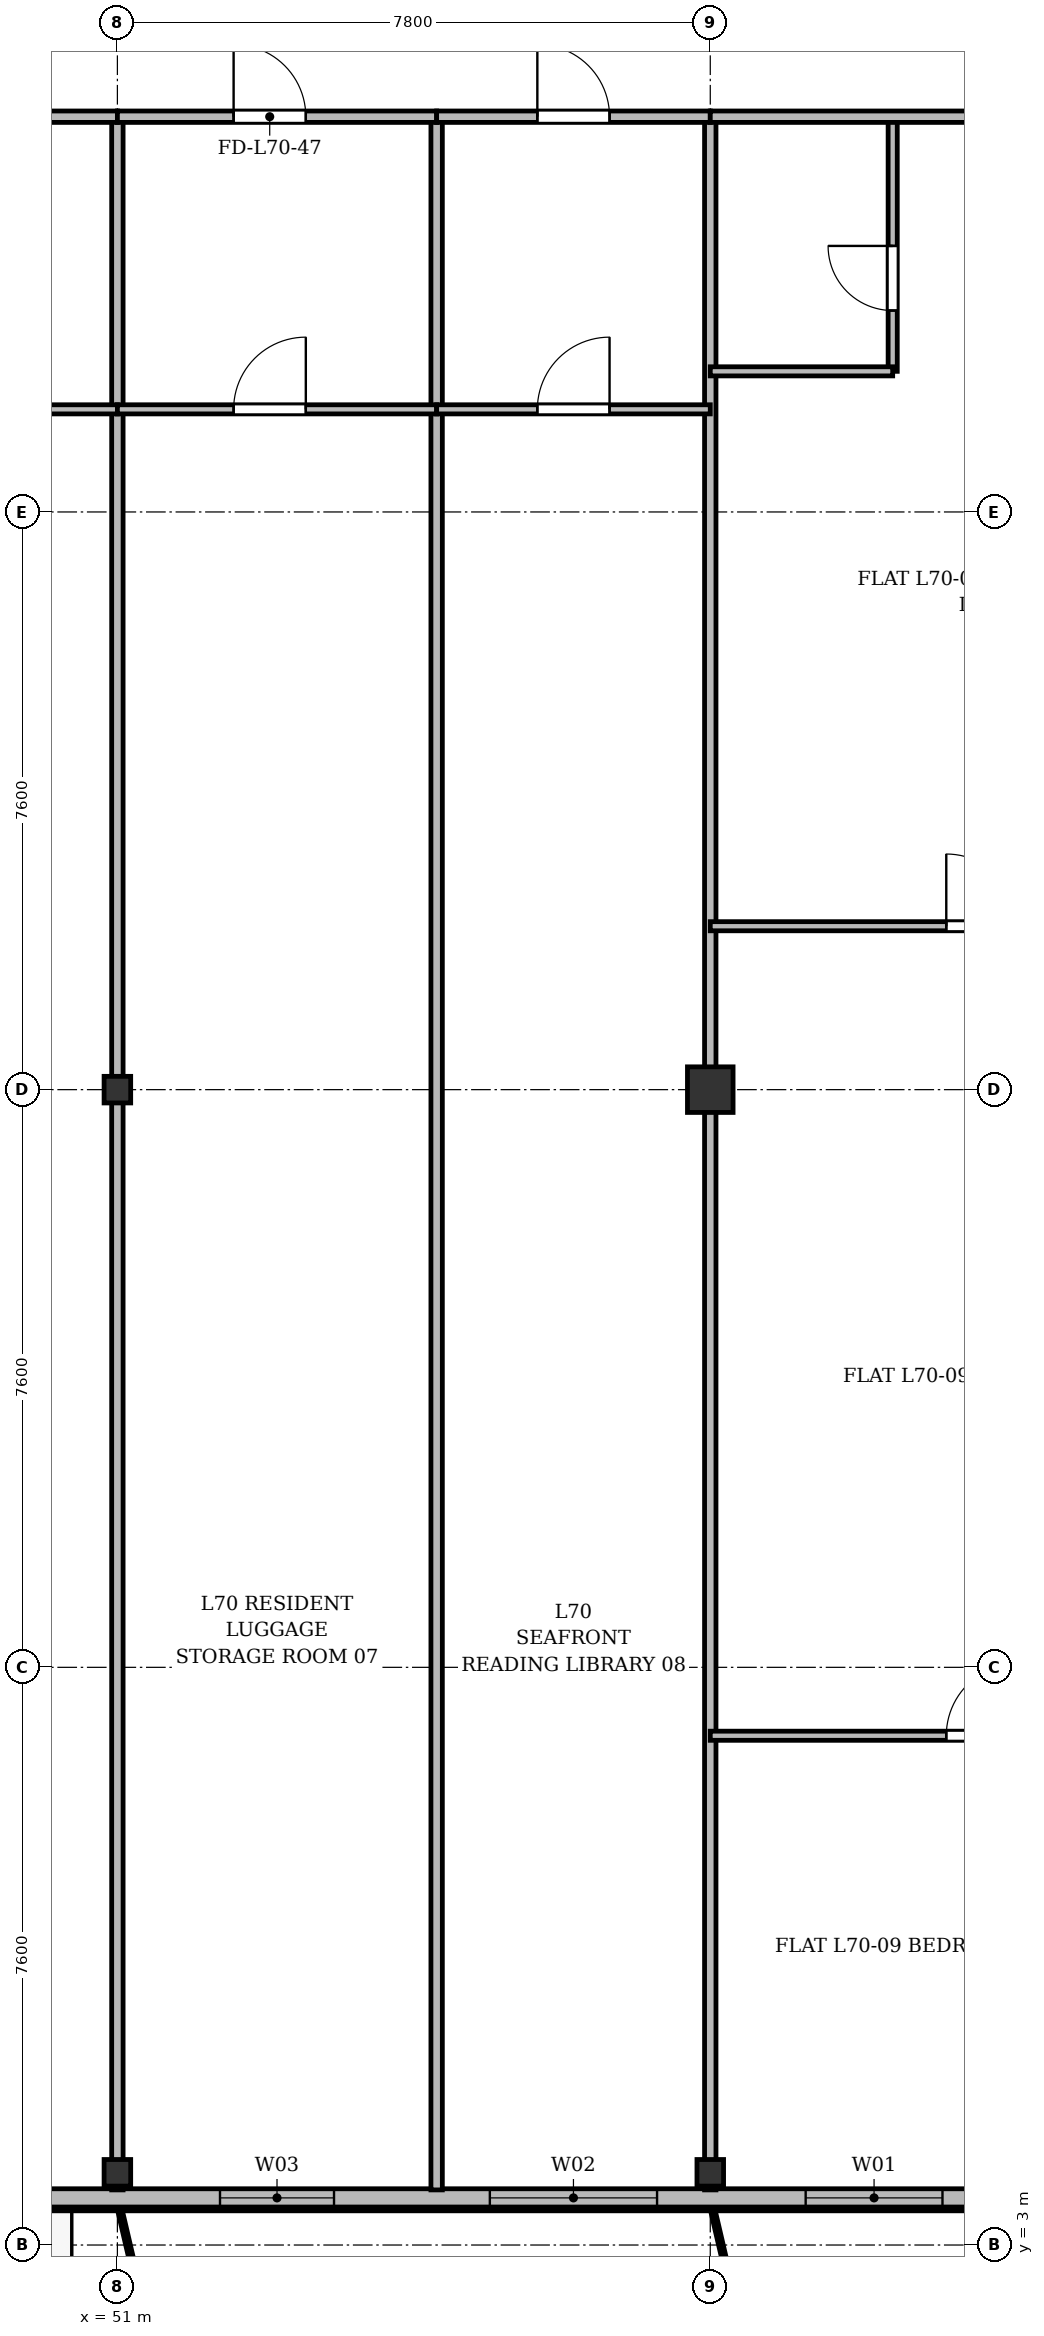
"""IFC4 building model, lengths in metres.
Left out: names, types, materials, properties, quantities, classifications, styles, units other than length and angle.
Written with IfcOpenShell. Run it as: python <this file> out.ifc"""

import sys

from ifc_helpers import new_model, si_unit, direction, frame, frame_2d, origin, origin_2d, place, context, subcontext, project, spatial, rectangle, i_section, extrude, source, transform, mapped, element, fill, save


model = new_model("IFC4")
c1 = context("Model", 3, precision=1e-05, world=origin(), true_north=direction((0.0, 1.0)))
c2 = subcontext(c1, "Body", "Model", "MODEL_VIEW")
j1 = project(units=[si_unit("LENGTHUNIT", "METRE"), si_unit("PLANEANGLEUNIT", "RADIAN")], contexts=[c1])
p1 = place(None, origin())
s1 = spatial("IfcSite", under=j1, at=p1, CompositionType="ELEMENT")
p2 = place(p1, origin())
s2 = spatial("IfcBuilding", under=s1, at=p2, CompositionType="ELEMENT")
p3 = place(p2, frame((0.0, 0.0, 270.3)))
s3 = spatial("IfcBuildingStorey", under=s2, at=p3, CompositionType="ELEMENT", Elevation=270.3)
m1 = source(origin(), c2, "Body", "SweptSolid", [
    extrude(i_section(OverallWidth=0.35, OverallDepth=0.35, WebThickness=0.018, FlangeThickness=0.028, at=origin_2d()), origin(), (0.0, 0.0, 1.0), 3.6),
])
for number, where, z_axis, x_axis in (
    (1, (51.0, 3.95, 0.0), (0.0, 0.0, 1.0), (1.0, 0.0, 0.0)),
    (2, (51.0, 18.2, 0.0), (0.0, 0.0, 1.0), (1.0, 0.0, 0.0)),
    (3, (58.8, 3.95, 0.0), (0.0, 0.0, 1.0), (1.0, 0.0, 0.0)),
):
    element("IfcColumn", number, at=place(p3, frame(where, z_axis=z_axis, x_axis=x_axis)), inside=s3, PredefinedType="COLUMN", context=c2, shape_type="MappedRepresentation", body=[
        mapped(m1, transform((0.0, 0.0, 0.0), x_axis=(1.0, 0.0, 0.0), y_axis=(0.0, 1.0, 0.0), z_axis=(0.0, 0.0, 1.0), scale=1.0)),
    ])
m2 = source(origin(), c2, "Body", "SweptSolid", [
    extrude(rectangle(XDim=0.6, YDim=0.6, at=origin_2d()), origin(), (0.0, 0.0, 1.0), 3.6),
])
p4 = place(p3, frame((58.8, 18.2, 0.0), z_axis=(0.0, 0.0, 1.0), x_axis=(1.0, 0.0, 0.0)))
e4 = element("IfcColumn", 4, at=p4, inside=s3, PredefinedType="COLUMN", context=c2, shape_type="MappedRepresentation", body=[
    mapped(m2, transform((0.0, 0.0, 0.0), x_axis=(1.0, 0.0, 0.0), y_axis=(0.0, 1.0, 0.0), z_axis=(0.0, 0.0, 1.0), scale=1.0)),
])
p5 = place(p3, frame((63.2, 3.62, 0.0), z_axis=(0.0, 0.0, 1.0), x_axis=(-1.0, 0.0, 0.0)))
e5 = element("IfcWall", 5, at=p5, inside=s3, PredefinedType="SOLIDWALL", context=c2, shape_type="SweptSolid", body=[
    extrude(rectangle(XDim=52.0, YDim=0.24, at=frame_2d((26.0, 0.0))), origin(), (0.0, 0.0, 1.0), 3.37),
])
p6 = place(p5, frame((1.345, 0.0, 0.9)))
e6 = element("IfcOpeningElement", 6, at=p6, cuts=e5, PredefinedType="OPENING", context=c2, shape_type="SweptSolid", body=[
    extrude(rectangle(XDim=1.8, YDim=1.8, at=frame_2d((0.9, 0.9))), frame((0.0, 0.13, 0.0), z_axis=(0.0, -1.0, 0.0), x_axis=(1.0, 0.0, 0.0)), (0.0, 0.0, 1.0), 0.26),
])
p7 = place(p5, frame((5.1, 0.0, 0.9)))
e7 = element("IfcOpeningElement", 7, at=p7, cuts=e5, PredefinedType="OPENING", context=c2, shape_type="SweptSolid", body=[
    extrude(rectangle(XDim=2.2, YDim=1.8, at=frame_2d((1.1, 0.9))), frame((0.0, 0.13, 0.0), z_axis=(0.0, -1.0, 0.0), x_axis=(1.0, 0.0, 0.0)), (0.0, 0.0, 1.0), 0.26),
])
p8 = place(p5, frame((9.35, 0.0, 0.9)))
e8 = element("IfcOpeningElement", 8, at=p8, cuts=e5, PredefinedType="OPENING", context=c2, shape_type="SweptSolid", body=[
    extrude(rectangle(XDim=1.5, YDim=1.75, at=frame_2d((0.75, 0.875))), frame((0.0, 0.13, 0.0), z_axis=(0.0, -1.0, 0.0), x_axis=(1.0, 0.0, 0.0)), (0.0, 0.0, 1.0), 0.26),
])
p9 = place(p5, frame((14.017, 0.0, 0.0)))
e9 = element("IfcOpeningElement", 9, at=p9, cuts=e5, PredefinedType="OPENING", context=c2, shape_type="SweptSolid", body=[
    extrude(rectangle(XDim=1.2, YDim=2.2, at=frame_2d((0.6, 1.1))), frame((0.0, 0.13, 0.0), z_axis=(0.0, -1.0, 0.0), x_axis=(1.0, 0.0, 0.0)), (0.0, 0.0, 1.0), 0.26),
])
p10 = place(p5, frame((25.175, 0.0, 0.9)))
e10 = element("IfcOpeningElement", 10, at=p10, cuts=e5, PredefinedType="OPENING", context=c2, shape_type="SweptSolid", body=[
    extrude(rectangle(XDim=1.65, YDim=1.85, at=frame_2d((0.825, 0.925))), frame((0.0, 0.13, 0.0), z_axis=(0.0, -1.0, 0.0), x_axis=(1.0, 0.0, 0.0)), (0.0, 0.0, 1.0), 0.26),
])
p11 = place(p5, frame((33.01, 0.0, 0.9)))
e11 = element("IfcOpeningElement", 11, at=p11, cuts=e5, PredefinedType="OPENING", context=c2, shape_type="SweptSolid", body=[
    extrude(rectangle(XDim=1.8, YDim=1.8, at=frame_2d((0.9, 0.9))), frame((0.0, 0.13, 0.0), z_axis=(0.0, -1.0, 0.0), x_axis=(1.0, 0.0, 0.0)), (0.0, 0.0, 1.0), 0.26),
])
p12 = place(p5, frame((35.45, 0.0, 0.9)))
e12 = element("IfcOpeningElement", 12, at=p12, cuts=e5, PredefinedType="OPENING", context=c2, shape_type="SweptSolid", body=[
    extrude(rectangle(XDim=1.5, YDim=1.75, at=frame_2d((0.75, 0.875))), frame((0.0, 0.13, 0.0), z_axis=(0.0, -1.0, 0.0), x_axis=(1.0, 0.0, 0.0)), (0.0, 0.0, 1.0), 0.26),
])
p13 = place(p5, frame((37.85, 0.0, 0.9)))
e13 = element("IfcOpeningElement", 13, at=p13, cuts=e5, PredefinedType="OPENING", context=c2, shape_type="SweptSolid", body=[
    extrude(rectangle(XDim=1.5, YDim=1.75, at=frame_2d((0.75, 0.875))), frame((0.0, 0.13, 0.0), z_axis=(0.0, -1.0, 0.0), x_axis=(1.0, 0.0, 0.0)), (0.0, 0.0, 1.0), 0.26),
])
p14 = place(p5, frame((41.452, 0.0, 0.0)))
e14 = element("IfcOpeningElement", 14, at=p14, cuts=e5, PredefinedType="OPENING", context=c2, shape_type="SweptSolid", body=[
    extrude(rectangle(XDim=1.2, YDim=2.2, at=frame_2d((0.6, 1.1))), frame((0.0, 0.13, 0.0), z_axis=(0.0, -1.0, 0.0), x_axis=(1.0, 0.0, 0.0)), (0.0, 0.0, 1.0), 0.26),
])
p15 = place(p5, frame((44.575, 0.0, 0.9)))
e15 = element("IfcOpeningElement", 15, at=p15, cuts=e5, PredefinedType="OPENING", context=c2, shape_type="SweptSolid", body=[
    extrude(rectangle(XDim=1.65, YDim=1.85, at=frame_2d((0.825, 0.925))), frame((0.0, 0.13, 0.0), z_axis=(0.0, -1.0, 0.0), x_axis=(1.0, 0.0, 0.0)), (0.0, 0.0, 1.0), 0.26),
])
p16 = place(p5, frame((48.855, 0.0, 0.9)))
e16 = element("IfcOpeningElement", 16, at=p16, cuts=e5, PredefinedType="OPENING", context=c2, shape_type="SweptSolid", body=[
    extrude(rectangle(XDim=1.8, YDim=1.8, at=frame_2d((0.9, 0.9))), frame((0.0, 0.13, 0.0), z_axis=(0.0, -1.0, 0.0), x_axis=(1.0, 0.0, 0.0)), (0.0, 0.0, 1.0), 0.26),
])
p17 = place(p3, frame((51.0, 3.725, 0.0), z_axis=(0.0, 0.0, 1.0), x_axis=(0.0, 1.0, 0.0)))
e17 = element("IfcWall", 17, at=p17, inside=s3, PredefinedType="PARTITIONING", context=c2, shape_type="SweptSolid", body=[
    extrude(rectangle(XDim=27.275, YDim=0.15, at=frame_2d((13.637, 0.0))), origin(), (0.0, 0.0, 1.0), 2.87),
])
p18 = place(p3, frame((55.2, 3.725, 0.0), z_axis=(0.0, 0.0, 1.0), x_axis=(0.0, 1.0, 0.0)))
e18 = element("IfcWall", 18, at=p18, inside=s3, PredefinedType="PARTITIONING", context=c2, shape_type="SweptSolid", body=[
    extrude(rectangle(XDim=27.275, YDim=0.15, at=frame_2d((13.637, 0.0))), origin(), (0.0, 0.0, 1.0), 2.92),
])
p19 = place(p3, frame((58.8, 3.725, 0.0), z_axis=(0.0, 0.0, 1.0), x_axis=(0.0, 1.0, 0.0)))
e19 = element("IfcWall", 19, at=p19, inside=s3, PredefinedType="PARTITIONING", context=c2, shape_type="SweptSolid", body=[
    extrude(rectangle(XDim=27.275, YDim=0.15, at=frame_2d((13.637, 0.0))), origin(), (0.0, 0.0, 1.0), 2.87),
])
p20 = place(p3, frame((43.8, 31.0, 0.0), z_axis=(0.0, 0.0, 1.0), x_axis=(1.0, 0.0, 0.0)))
e20 = element("IfcWall", 20, at=p20, inside=s3, PredefinedType="PARTITIONING", context=c2, shape_type="SweptSolid", body=[
    extrude(rectangle(XDim=7.2, YDim=0.15, at=frame_2d((3.6, 0.0))), origin(), (0.0, 0.0, 1.0), 2.87),
])
p21 = place(p20, frame((3.125, 0.0, 0.0)))
e21 = element("IfcOpeningElement", 21, at=p21, cuts=e20, PredefinedType="OPENING", context=c2, shape_type="SweptSolid", body=[
    extrude(rectangle(XDim=0.95, YDim=2.15, at=frame_2d((0.475, 1.075))), frame((0.0, 0.085, 0.0), z_axis=(0.0, -1.0, 0.0), x_axis=(1.0, 0.0, 0.0)), (0.0, 0.0, 1.0), 0.17),
])
p22 = place(p3, frame((43.8, 27.15, 0.0), z_axis=(0.0, 0.0, 1.0), x_axis=(1.0, 0.0, 0.0)))
e22 = element("IfcWall", 22, at=p22, inside=s3, PredefinedType="PARTITIONING", context=c2, shape_type="SweptSolid", body=[
    extrude(rectangle(XDim=7.2, YDim=0.12, at=frame_2d((3.6, 0.0))), origin(), (0.0, 0.0, 1.0), 2.87),
])
p23 = place(p22, frame((3.125, 0.0, 0.0)))
e23 = element("IfcOpeningElement", 23, at=p23, cuts=e22, PredefinedType="OPENING", context=c2, shape_type="SweptSolid", body=[
    extrude(rectangle(XDim=0.95, YDim=2.15, at=frame_2d((0.475, 1.075))), frame((0.0, 0.07, 0.0), z_axis=(0.0, -1.0, 0.0), x_axis=(1.0, 0.0, 0.0)), (0.0, 0.0, 1.0), 0.14),
])
p24 = place(p3, frame((51.0, 31.0, 0.0), z_axis=(0.0, 0.0, 1.0), x_axis=(1.0, 0.0, 0.0)))
e24 = element("IfcWall", 24, at=p24, inside=s3, PredefinedType="PARTITIONING", context=c2, shape_type="SweptSolid", body=[
    extrude(rectangle(XDim=4.2, YDim=0.15, at=frame_2d((2.1, 0.0))), origin(), (0.0, 0.0, 1.0), 2.87),
])
p25 = place(p24, frame((1.529, 0.0, 0.0)))
e25 = element("IfcOpeningElement", 25, at=p25, cuts=e24, PredefinedType="OPENING", context=c2, shape_type="SweptSolid", body=[
    extrude(rectangle(XDim=0.95, YDim=2.15, at=frame_2d((0.475, 1.075))), frame((0.0, 0.085, 0.0), z_axis=(0.0, -1.0, 0.0), x_axis=(1.0, 0.0, 0.0)), (0.0, 0.0, 1.0), 0.17),
])
p26 = place(p3, frame((51.0, 27.15, 0.0), z_axis=(0.0, 0.0, 1.0), x_axis=(1.0, 0.0, 0.0)))
e26 = element("IfcWall", 26, at=p26, inside=s3, PredefinedType="PARTITIONING", context=c2, shape_type="SweptSolid", body=[
    extrude(rectangle(XDim=4.2, YDim=0.12, at=frame_2d((2.1, 0.0))), origin(), (0.0, 0.0, 1.0), 2.87),
])
p27 = place(p26, frame((1.529, 0.0, 0.0)))
e27 = element("IfcOpeningElement", 27, at=p27, cuts=e26, PredefinedType="OPENING", context=c2, shape_type="SweptSolid", body=[
    extrude(rectangle(XDim=0.95, YDim=2.15, at=frame_2d((0.475, 1.075))), frame((0.0, 0.07, 0.0), z_axis=(0.0, -1.0, 0.0), x_axis=(1.0, 0.0, 0.0)), (0.0, 0.0, 1.0), 0.14),
])
p28 = place(p3, frame((55.2, 31.0, 0.0), z_axis=(0.0, 0.0, 1.0), x_axis=(1.0, 0.0, 0.0)))
e28 = element("IfcWall", 28, at=p28, inside=s3, PredefinedType="PARTITIONING", context=c2, shape_type="SweptSolid", body=[
    extrude(rectangle(XDim=3.6, YDim=0.15, at=frame_2d((1.8, 0.0))), origin(), (0.0, 0.0, 1.0), 2.87),
])
p29 = place(p28, frame((1.325, 0.0, 0.0)))
e29 = element("IfcOpeningElement", 29, at=p29, cuts=e28, PredefinedType="OPENING", context=c2, shape_type="SweptSolid", body=[
    extrude(rectangle(XDim=0.95, YDim=2.15, at=frame_2d((0.475, 1.075))), frame((0.0, 0.085, 0.0), z_axis=(0.0, -1.0, 0.0), x_axis=(1.0, 0.0, 0.0)), (0.0, 0.0, 1.0), 0.17),
])
p30 = place(p3, frame((55.2, 27.15, 0.0), z_axis=(0.0, 0.0, 1.0), x_axis=(1.0, 0.0, 0.0)))
e30 = element("IfcWall", 30, at=p30, inside=s3, PredefinedType="PARTITIONING", context=c2, shape_type="SweptSolid", body=[
    extrude(rectangle(XDim=3.6, YDim=0.12, at=frame_2d((1.8, 0.0))), origin(), (0.0, 0.0, 1.0), 2.87),
])
p31 = place(p30, frame((1.325, 0.0, 0.0)))
e31 = element("IfcOpeningElement", 31, at=p31, cuts=e30, PredefinedType="OPENING", context=c2, shape_type="SweptSolid", body=[
    extrude(rectangle(XDim=0.95, YDim=2.15, at=frame_2d((0.475, 1.075))), frame((0.0, 0.07, 0.0), z_axis=(0.0, -1.0, 0.0), x_axis=(1.0, 0.0, 0.0)), (0.0, 0.0, 1.0), 0.14),
])
p32 = place(p3, frame((58.8, 20.35, 0.0), z_axis=(0.0, 0.0, 1.0), x_axis=(1.0, 0.0, 0.0)))
e32 = element("IfcWall", 32, at=p32, inside=s3, PredefinedType="PARTITIONING", context=c2, shape_type="SweptSolid", body=[
    extrude(rectangle(XDim=7.16, YDim=0.12, at=frame_2d((3.58, 0.0))), origin(), (0.0, 0.0, 1.0), 2.87),
])
p33 = place(p32, frame((3.105, 0.0, 0.0)))
e33 = element("IfcOpeningElement", 33, at=p33, cuts=e32, PredefinedType="OPENING", context=c2, shape_type="SweptSolid", body=[
    extrude(rectangle(XDim=0.95, YDim=2.15, at=frame_2d((0.475, 1.075))), frame((0.0, 0.07, 0.0), z_axis=(0.0, -1.0, 0.0), x_axis=(1.0, 0.0, 0.0)), (0.0, 0.0, 1.0), 0.14),
])
p34 = place(p3, frame((61.2, 27.65, 0.0), z_axis=(0.0, 0.0, 1.0), x_axis=(0.0, 1.0, 0.0)))
e34 = element("IfcWall", 34, at=p34, inside=s3, PredefinedType="PARTITIONING", context=c2, shape_type="SweptSolid", body=[
    extrude(rectangle(XDim=3.35, YDim=0.12, at=frame_2d((1.675, 0.0))), origin(), (0.0, 0.0, 1.0), 3.37),
])
p35 = place(p34, frame((0.8, 0.0, 0.0)))
e35 = element("IfcOpeningElement", 35, at=p35, cuts=e34, PredefinedType="OPENING", context=c2, shape_type="SweptSolid", body=[
    extrude(rectangle(XDim=0.85, YDim=2.1, at=frame_2d((0.425, 1.05))), frame((0.0, 0.07, 0.0), z_axis=(0.0, -1.0, 0.0), x_axis=(1.0, 0.0, 0.0)), (0.0, 0.0, 1.0), 0.14),
])
p36 = place(p3, frame((58.8, 27.65, 0.0), z_axis=(0.0, 0.0, 1.0), x_axis=(1.0, 0.0, 0.0)))
e36 = element("IfcWall", 36, at=p36, inside=s3, PredefinedType="PARTITIONING", context=c2, shape_type="SweptSolid", body=[
    extrude(rectangle(XDim=2.4, YDim=0.12, at=frame_2d((1.2, 0.0))), origin(), (0.0, 0.0, 1.0), 2.87),
])
p37 = place(p3, frame((58.8, 31.0, 0.0), z_axis=(0.0, 0.0, 1.0), x_axis=(1.0, 0.0, 0.0)))
e37 = element("IfcWall", 37, at=p37, inside=s3, PredefinedType="PARTITIONING", context=c2, shape_type="SweptSolid", body=[
    extrude(rectangle(XDim=7.175, YDim=0.15, at=frame_2d((3.587, 0.0))), origin(), (0.0, 0.0, 1.0), 2.87),
])
p38 = place(p37, frame((4.681, 0.0, 0.0)))
e38 = element("IfcOpeningElement", 38, at=p38, cuts=e37, PredefinedType="OPENING", context=c2, shape_type="SweptSolid", body=[
    extrude(rectangle(XDim=0.95, YDim=2.15, at=frame_2d((0.475, 1.075))), frame((0.0, 0.085, 0.0), z_axis=(0.0, -1.0, 0.0), x_axis=(1.0, 0.0, 0.0)), (0.0, 0.0, 1.0), 0.17),
])
p39 = place(p3, frame((58.8, 9.7, 0.0), z_axis=(0.0, 0.0, 1.0), x_axis=(1.0, 0.0, 0.0)))
e39 = element("IfcWall", 39, at=p39, inside=s3, PredefinedType="PARTITIONING", context=c2, shape_type="SweptSolid", body=[
    extrude(rectangle(XDim=7.16, YDim=0.12, at=frame_2d((3.58, 0.0))), origin(), (0.0, 0.0, 1.0), 2.87),
])
p40 = place(p39, frame((3.105, 0.0, 0.0)))
e40 = element("IfcOpeningElement", 40, at=p40, cuts=e39, PredefinedType="OPENING", context=c2, shape_type="SweptSolid", body=[
    extrude(rectangle(XDim=0.95, YDim=2.15, at=frame_2d((0.475, 1.075))), frame((0.0, 0.07, 0.0), z_axis=(0.0, -1.0, 0.0), x_axis=(1.0, 0.0, 0.0)), (0.0, 0.0, 1.0), 0.14),
])
m3 = source(origin(), c2, "Body", "SweptSolid", [
    extrude(rectangle(XDim=1.8, YDim=1.8, at=frame_2d((0.9, 0.9))), frame((0.0, 0.03, 0.0), z_axis=(0.0, -1.0, 0.0), x_axis=(1.0, 0.0, 0.0)), (0.0, 0.0, 1.0), 0.06),
])
p41 = place(p6, origin())
e41 = element("IfcWindow", 41, at=p41, inside=s3, PartitioningType="SINGLE_PANEL", PredefinedType="WINDOW", context=c2, shape_type="MappedRepresentation", body=[
    mapped(m3, transform((0.0, 0.0, 0.0), x_axis=(1.0, 0.0, 0.0), y_axis=(0.0, 1.0, 0.0), z_axis=(0.0, 0.0, 1.0), scale=1.0)),
])
fill(e6, e41)
m4 = source(origin(), c2, "Body", "SweptSolid", [
    extrude(rectangle(XDim=2.2, YDim=1.8, at=frame_2d((1.1, 0.9))), frame((0.0, 0.03, 0.0), z_axis=(0.0, -1.0, 0.0), x_axis=(1.0, 0.0, 0.0)), (0.0, 0.0, 1.0), 0.06),
])
p42 = place(p7, origin())
e42 = element("IfcWindow", 42, at=p42, inside=s3, PartitioningType="SINGLE_PANEL", PredefinedType="WINDOW", context=c2, shape_type="MappedRepresentation", body=[
    mapped(m4, transform((0.0, 0.0, 0.0), x_axis=(1.0, 0.0, 0.0), y_axis=(0.0, 1.0, 0.0), z_axis=(0.0, 0.0, 1.0), scale=1.0)),
])
fill(e7, e42)
m5 = source(origin(), c2, "Body", "SweptSolid", [
    extrude(rectangle(XDim=1.5, YDim=1.75, at=frame_2d((0.75, 0.875))), frame((0.0, 0.03, 0.0), z_axis=(0.0, -1.0, 0.0), x_axis=(1.0, 0.0, 0.0)), (0.0, 0.0, 1.0), 0.06),
])
p43 = place(p8, origin())
e43 = element("IfcWindow", 43, at=p43, inside=s3, PartitioningType="SINGLE_PANEL", PredefinedType="WINDOW", context=c2, shape_type="MappedRepresentation", body=[
    mapped(m5, transform((0.0, 0.0, 0.0), x_axis=(1.0, 0.0, 0.0), y_axis=(0.0, 1.0, 0.0), z_axis=(0.0, 0.0, 1.0), scale=1.0)),
])
fill(e8, e43)
m6 = source(origin(), c2, "Body", "SweptSolid", [
    extrude(rectangle(XDim=0.95, YDim=2.15, at=frame_2d((0.475, 1.075))), frame((0.0, 0.025, 0.0), z_axis=(0.0, -1.0, 0.0), x_axis=(1.0, 0.0, 0.0)), (0.0, 0.0, 1.0), 0.05),
])
p44 = place(p25, origin())
e44 = element("IfcDoor", 44, at=p44, inside=s3, OperationType="SINGLE_SWING_LEFT", PredefinedType="DOOR", context=c2, shape_type="MappedRepresentation", body=[
    mapped(m6, transform((0.0, 0.0, 0.0), x_axis=(1.0, 0.0, 0.0), y_axis=(0.0, 1.0, 0.0), z_axis=(0.0, 0.0, 1.0), scale=1.0)),
])
fill(e25, e44)
p45 = place(p27, origin())
e45 = element("IfcDoor", 45, at=p45, inside=s3, OperationType="SINGLE_SWING_RIGHT", PredefinedType="DOOR", context=c2, shape_type="MappedRepresentation", body=[
    mapped(m6, transform((0.0, 0.0, 0.0), x_axis=(1.0, 0.0, 0.0), y_axis=(0.0, 1.0, 0.0), z_axis=(0.0, 0.0, 1.0), scale=1.0)),
])
fill(e27, e45)
p46 = place(p29, origin())
e46 = element("IfcDoor", 46, at=p46, inside=s3, OperationType="SINGLE_SWING_LEFT", PredefinedType="DOOR", context=c2, shape_type="MappedRepresentation", body=[
    mapped(m6, transform((0.0, 0.0, 0.0), x_axis=(1.0, 0.0, 0.0), y_axis=(0.0, 1.0, 0.0), z_axis=(0.0, 0.0, 1.0), scale=1.0)),
])
fill(e29, e46)
p47 = place(p31, origin())
e47 = element("IfcDoor", 47, at=p47, inside=s3, OperationType="SINGLE_SWING_RIGHT", PredefinedType="DOOR", context=c2, shape_type="MappedRepresentation", body=[
    mapped(m6, transform((0.0, 0.0, 0.0), x_axis=(1.0, 0.0, 0.0), y_axis=(0.0, 1.0, 0.0), z_axis=(0.0, 0.0, 1.0), scale=1.0)),
])
fill(e31, e47)
p48 = place(p33, origin())
e48 = element("IfcDoor", 48, at=p48, inside=s3, OperationType="SINGLE_SWING_LEFT", PredefinedType="DOOR", context=c2, shape_type="MappedRepresentation", body=[
    mapped(m6, transform((0.0, 0.0, 0.0), x_axis=(1.0, 0.0, 0.0), y_axis=(0.0, 1.0, 0.0), z_axis=(0.0, 0.0, 1.0), scale=1.0)),
])
fill(e33, e48)
m7 = source(origin(), c2, "Body", "SweptSolid", [
    extrude(rectangle(XDim=0.85, YDim=2.1, at=frame_2d((0.425, 1.05))), frame((0.0, 0.025, 0.0), z_axis=(0.0, -1.0, 0.0), x_axis=(1.0, 0.0, 0.0)), (0.0, 0.0, 1.0), 0.05),
])
p49 = place(p35, origin())
e49 = element("IfcDoor", 49, at=p49, inside=s3, OperationType="SINGLE_SWING_RIGHT", PredefinedType="DOOR", context=c2, shape_type="MappedRepresentation", body=[
    mapped(m7, transform((0.0, 0.0, 0.0), x_axis=(1.0, 0.0, 0.0), y_axis=(0.0, 1.0, 0.0), z_axis=(0.0, 0.0, 1.0), scale=1.0)),
])
fill(e35, e49)
p50 = place(p40, origin())
e50 = element("IfcDoor", 50, at=p50, inside=s3, OperationType="SINGLE_SWING_RIGHT", PredefinedType="DOOR", context=c2, shape_type="MappedRepresentation", body=[
    mapped(m6, transform((0.0, 0.0, 0.0), x_axis=(1.0, 0.0, 0.0), y_axis=(0.0, 1.0, 0.0), z_axis=(0.0, 0.0, 1.0), scale=1.0)),
])
fill(e40, e50)
save(model, sys.argv[1])
